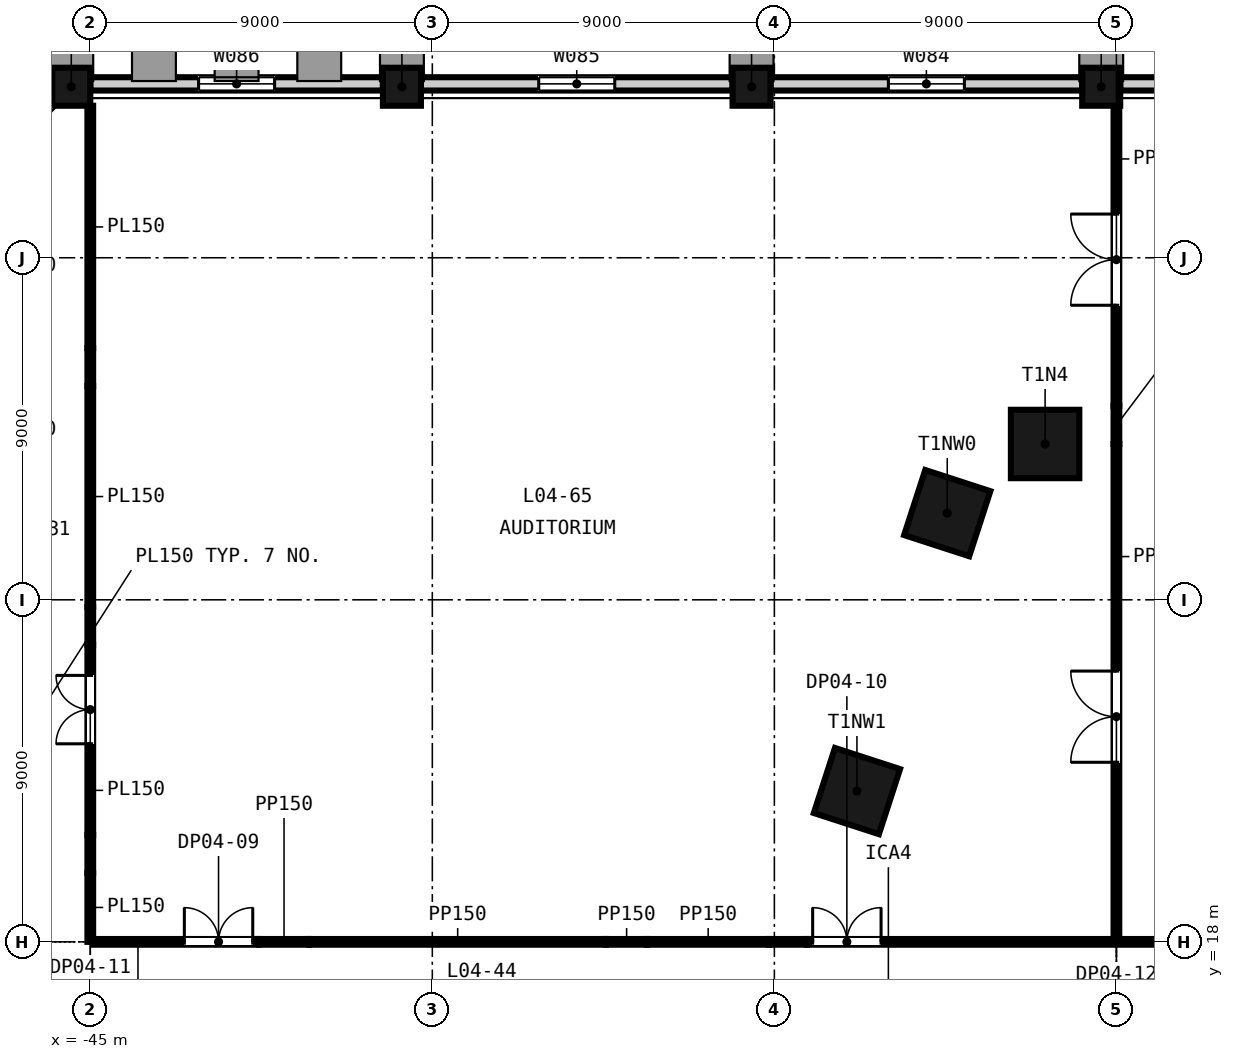
"""IFC4 building model, lengths in metres.
Left out: names, types, materials, properties, quantities, classifications, styles, units other than length and angle.
Written with IfcOpenShell. Run it as: python <this file> out.ifc"""

import sys

from ifc_helpers import new_model, si_unit, direction, frame, frame_2d, origin, origin_2d, place, context, subcontext, project, spatial, rectangle, extrude, element, fill, save


model = new_model("IFC4")
c1 = context("Model", 3, precision=1e-05, world=origin(), true_north=direction((0.0, 1.0)))
c2 = subcontext(c1, "Body", "Model", "MODEL_VIEW")
j1 = project(units=[si_unit("LENGTHUNIT", "METRE"), si_unit("PLANEANGLEUNIT", "RADIAN")], contexts=[c1])
p1 = place(None, origin())
s1 = spatial("IfcSite", under=j1, at=p1, CompositionType="ELEMENT")
p2 = place(p1, origin())
s2 = spatial("IfcBuilding", under=s1, at=p2, CompositionType="ELEMENT")
p3 = place(p2, frame((0.0, 0.0, 27.0)))
s3 = spatial("IfcBuildingStorey", under=s2, at=p3, CompositionType="ELEMENT", Elevation=27.0)
for number, where, z_axis, x_axis in (
    (1, (-19.876, 31.1, -0.3), (0.0, 0.0, 1.0), (-1.0, 0.0, 0.0)),
    (2, (-22.451, 29.281, -0.3), (0.0, 0.0, 1.0), (-0.309, -0.951, 0.0)),
    (3, (-24.827, 21.968, -0.3), (0.0, 0.0, 1.0), (-0.309, -0.951, 0.0)),
):
    element("IfcColumn", number, at=place(p3, frame(where, z_axis=z_axis, x_axis=x_axis)), inside=s3, PredefinedType="COLUMN", context=c2, shape_type="SweptSolid", body=[
        extrude(rectangle(XDim=1.8, YDim=1.8, at=origin_2d()), origin(), (0.0, 0.0, 1.0), 4.5),
    ])
for number, where, z_axis, x_axis in (
    (4, (-18.4, 40.5, -0.3), (0.0, 0.0, 1.0), (-1.0, 0.0, 0.0)),
    (5, (-27.6, 40.5, -0.3), (0.0, 0.0, 1.0), (-1.0, 0.0, 0.0)),
    (6, (-36.8, 40.5, -0.3), (0.0, 0.0, 1.0), (-1.0, 0.0, 0.0)),
    (7, (-45.5, 40.5, -0.3), (0.0, 0.0, 1.0), (-1.0, 0.0, 0.0)),
):
    element("IfcColumn", number, at=place(p3, frame(where, z_axis=z_axis, x_axis=x_axis)), inside=s3, PredefinedType="COLUMN", context=c2, shape_type="SweptSolid", body=[
        extrude(rectangle(XDim=1.0, YDim=1.0, at=origin_2d()), origin(), (0.0, 0.0, 1.0), 4.5),
    ])
p4 = place(p3, frame((-9.7, 40.575, -0.3), z_axis=(0.0, 0.0, 1.0), x_axis=(-1.0, 0.0, 0.0)))
e8 = element("IfcWall", 8, at=p4, inside=s3, PredefinedType="SOLIDWALL", context=c2, shape_type="SweptSolid", body=[
    extrude(rectangle(XDim=8.2, YDim=0.35, at=frame_2d((4.1, 0.0))), origin(), (0.0, 0.0, 1.0), 3.6),
])
p5 = place(p4, frame((3.1, 0.0, 1.2)))
e9 = element("IfcOpeningElement", 9, at=p5, cuts=e8, PredefinedType="OPENING", context=c2, shape_type="SweptSolid", body=[
    extrude(rectangle(XDim=2.0, YDim=2.35, at=frame_2d((1.0, 1.175))), frame((0.0, 0.185, 0.0), z_axis=(0.0, -1.0, 0.0), x_axis=(1.0, 0.0, 0.0)), (0.0, 0.0, 1.0), 0.37),
])
p6 = place(p3, frame((-18.9, 40.575, -0.3), z_axis=(0.0, 0.0, 1.0), x_axis=(-1.0, 0.0, 0.0)))
e10 = element("IfcWall", 10, at=p6, inside=s3, PredefinedType="SOLIDWALL", context=c2, shape_type="SweptSolid", body=[
    extrude(rectangle(XDim=8.2, YDim=0.35, at=frame_2d((4.1, 0.0))), origin(), (0.0, 0.0, 1.0), 3.6),
])
p7 = place(p6, frame((3.1, 0.0, 1.2)))
e11 = element("IfcOpeningElement", 11, at=p7, cuts=e10, PredefinedType="OPENING", context=c2, shape_type="SweptSolid", body=[
    extrude(rectangle(XDim=2.0, YDim=2.35, at=frame_2d((1.0, 1.175))), frame((0.0, 0.185, 0.0), z_axis=(0.0, -1.0, 0.0), x_axis=(1.0, 0.0, 0.0)), (0.0, 0.0, 1.0), 0.37),
])
p8 = place(p3, frame((-28.1, 40.575, -0.3), z_axis=(0.0, 0.0, 1.0), x_axis=(-1.0, 0.0, 0.0)))
e12 = element("IfcWall", 12, at=p8, inside=s3, PredefinedType="SOLIDWALL", context=c2, shape_type="SweptSolid", body=[
    extrude(rectangle(XDim=8.2, YDim=0.35, at=frame_2d((4.1, 0.0))), origin(), (0.0, 0.0, 1.0), 3.6),
])
p9 = place(p8, frame((3.1, 0.0, 1.2)))
e13 = element("IfcOpeningElement", 13, at=p9, cuts=e12, PredefinedType="OPENING", context=c2, shape_type="SweptSolid", body=[
    extrude(rectangle(XDim=2.0, YDim=2.35, at=frame_2d((1.0, 1.175))), frame((0.0, 0.185, 0.0), z_axis=(0.0, -1.0, 0.0), x_axis=(1.0, 0.0, 0.0)), (0.0, 0.0, 1.0), 0.37),
])
p10 = place(p3, frame((-37.3, 40.575, -0.3), z_axis=(0.0, 0.0, 1.0), x_axis=(-1.0, 0.0, 0.0)))
e14 = element("IfcWall", 14, at=p10, inside=s3, PredefinedType="SOLIDWALL", context=c2, shape_type="SweptSolid", body=[
    extrude(rectangle(XDim=7.7, YDim=0.35, at=frame_2d((3.85, 0.0))), origin(), (0.0, 0.0, 1.0), 3.6),
])
p11 = place(p10, frame((2.85, 0.0, 1.2)))
e15 = element("IfcOpeningElement", 15, at=p11, cuts=e14, PredefinedType="OPENING", context=c2, shape_type="SweptSolid", body=[
    extrude(rectangle(XDim=2.0, YDim=2.35, at=frame_2d((1.0, 1.175))), frame((0.0, 0.185, 0.0), z_axis=(0.0, -1.0, 0.0), x_axis=(1.0, 0.0, 0.0)), (0.0, 0.0, 1.0), 0.37),
])
p12 = place(p3, frame((-46.072, 40.327, -0.3), z_axis=(0.0, 0.0, 1.0), x_axis=(-0.707106781187, -0.707106781187, 0.0)))
e16 = element("IfcWall", 16, at=p12, inside=s3, PredefinedType="SOLIDWALL", context=c2, shape_type="SweptSolid", body=[
    extrude(rectangle(XDim=7.433, YDim=0.35, at=frame_2d((3.716, 0.0))), origin(), (0.0, 0.0, 1.0), 3.6),
])
p13 = place(p3, frame((-44.925, 18.0, 0.0), z_axis=(0.0, 0.0, 1.0), x_axis=(1.0, 0.0, 0.0)))
e17 = element("IfcWall", 17, at=p13, inside=s3, PredefinedType="PARTITIONING", context=c2, shape_type="SweptSolid", body=[
    extrude(rectangle(XDim=4.353, YDim=0.15, at=frame_2d((2.176, 0.0))), origin(), (0.0, 0.0, 1.0), 4.2),
])
p14 = place(p13, frame((2.4, 0.0, 0.0)))
e18 = element("IfcOpeningElement", 18, at=p14, cuts=e17, PredefinedType="OPENING", context=c2, shape_type="SweptSolid", body=[
    extrude(rectangle(XDim=1.8, YDim=2.4, at=frame_2d((0.9, 1.2))), frame((0.0, 0.085, 0.0), z_axis=(0.0, -1.0, 0.0), x_axis=(1.0, 0.0, 0.0)), (0.0, 0.0, 1.0), 0.17),
])
p15 = place(p3, frame((-40.572, 18.0, 0.0), z_axis=(0.0, 0.0, 1.0), x_axis=(1.0, 0.0, 0.0)))
e19 = element("IfcWall", 19, at=p15, inside=s3, PredefinedType="PARTITIONING", context=c2, shape_type="SweptSolid", body=[
    extrude(rectangle(XDim=1.331, YDim=0.15, at=frame_2d((0.666, 0.0))), origin(), (0.0, 0.0, 1.0), 3.111),
])
p16 = place(p3, frame((-39.241, 18.0, 0.0), z_axis=(0.0, 0.0, 1.0), x_axis=(1.0, 0.0, 0.0)))
e20 = element("IfcWall", 20, at=p16, inside=s3, PredefinedType="PARTITIONING", context=c2, shape_type="SweptSolid", body=[
    extrude(rectangle(XDim=7.807, YDim=0.15, at=frame_2d((3.903, 0.0))), origin(), (0.0, 0.0, 1.0), 4.2),
])
p17 = place(p3, frame((-31.434, 18.0, 0.0), z_axis=(0.0, 0.0, 1.0), x_axis=(1.0, 0.0, 0.0)))
e21 = element("IfcWall", 21, at=p17, inside=s3, PredefinedType="PARTITIONING", context=c2, shape_type="SweptSolid", body=[
    extrude(rectangle(XDim=1.083, YDim=0.15, at=frame_2d((0.542, 0.0))), origin(), (0.0, 0.0, 1.0), 3.111),
])
p18 = place(p3, frame((-30.351, 18.0, 0.0), z_axis=(0.0, 0.0, 1.0), x_axis=(1.0, 0.0, 0.0)))
e22 = element("IfcWall", 22, at=p18, inside=s3, PredefinedType="PARTITIONING", context=c2, shape_type="SweptSolid", body=[
    extrude(rectangle(XDim=3.209, YDim=0.15, at=frame_2d((1.604, 0.0))), origin(), (0.0, 0.0, 1.0), 4.2),
])
p19 = place(p3, frame((-27.142, 18.0, 0.0), z_axis=(0.0, 0.0, 1.0), x_axis=(1.0, 0.0, 0.0)))
e23 = element("IfcWall", 23, at=p19, inside=s3, PredefinedType="PARTITIONING", context=c2, shape_type="SweptSolid", body=[
    extrude(rectangle(XDim=1.0, YDim=0.15, at=frame_2d((0.5, 0.0))), origin(), (0.0, 0.0, 1.0), 3.2),
])
p20 = place(p3, frame((-26.142, 18.0, 0.0), z_axis=(0.0, 0.0, 1.0), x_axis=(1.0, 0.0, 0.0)))
e24 = element("IfcWall", 24, at=p20, inside=s3, PredefinedType="PARTITIONING", context=c2, shape_type="SweptSolid", body=[
    extrude(rectangle(XDim=44.067, YDim=0.15, at=frame_2d((22.034, 0.0))), origin(), (0.0, 0.0, 1.0), 4.2),
])
p21 = place(p20, frame((0.15, 0.0, 0.0)))
e25 = element("IfcOpeningElement", 25, at=p21, cuts=e24, PredefinedType="OPENING", context=c2, shape_type="SweptSolid", body=[
    extrude(rectangle(XDim=1.8, YDim=2.4, at=frame_2d((0.9, 1.2))), frame((0.0, 0.085, 0.0), z_axis=(0.0, -1.0, 0.0), x_axis=(1.0, 0.0, 0.0)), (0.0, 0.0, 1.0), 0.17),
])
p22 = place(p20, frame((12.292, 0.0, 0.0)))
e26 = element("IfcOpeningElement", 26, at=p22, cuts=e24, PredefinedType="OPENING", context=c2, shape_type="SweptSolid", body=[
    extrude(rectangle(XDim=1.8, YDim=2.4, at=frame_2d((0.9, 1.2))), frame((0.0, 0.085, 0.0), z_axis=(0.0, -1.0, 0.0), x_axis=(1.0, 0.0, 0.0)), (0.0, 0.0, 1.0), 0.17),
])
p23 = place(p20, frame((29.542, 0.0, 0.0)))
e27 = element("IfcOpeningElement", 27, at=p23, cuts=e24, PredefinedType="OPENING", context=c2, shape_type="SweptSolid", body=[
    extrude(rectangle(XDim=1.0, YDim=2.1, at=frame_2d((0.5, 1.05))), frame((0.0, 0.085, 0.0), z_axis=(0.0, -1.0, 0.0), x_axis=(1.0, 0.0, 0.0)), (0.0, 0.0, 1.0), 0.17),
])
p24 = place(p20, frame((38.542, 0.0, 0.0)))
e28 = element("IfcOpeningElement", 28, at=p24, cuts=e24, PredefinedType="OPENING", context=c2, shape_type="SweptSolid", body=[
    extrude(rectangle(XDim=1.0, YDim=2.1, at=frame_2d((0.5, 1.05))), frame((0.0, 0.085, 0.0), z_axis=(0.0, -1.0, 0.0), x_axis=(1.0, 0.0, 0.0)), (0.0, 0.0, 1.0), 0.17),
])
p25 = place(p3, frame((-45.0, 18.0, 0.0), z_axis=(0.0, 0.0, 1.0), x_axis=(0.0, 1.0, 0.0)))
e29 = element("IfcWall", 29, at=p25, inside=s3, PredefinedType="PARTITIONING", context=c2, shape_type="SweptSolid", body=[
    extrude(rectangle(XDim=1.811, YDim=0.15, at=frame_2d((0.906, 0.0))), origin(), (0.0, 0.0, 1.0), 4.2),
])
p26 = place(p3, frame((-45.0, 19.811, 0.0), z_axis=(0.0, 0.0, 1.0), x_axis=(0.0, 1.0, 0.0)))
e30 = element("IfcWall", 30, at=p26, inside=s3, PredefinedType="PARTITIONING", context=c2, shape_type="SweptSolid", body=[
    extrude(rectangle(XDim=1.0, YDim=0.15, at=frame_2d((0.5, 0.0))), origin(), (0.0, 0.0, 1.0), 3.111),
])
p27 = place(p3, frame((-45.0, 20.811, 0.0), z_axis=(0.0, 0.0, 1.0), x_axis=(0.0, 1.0, 0.0)))
e31 = element("IfcWall", 31, at=p27, inside=s3, PredefinedType="PARTITIONING", context=c2, shape_type="SweptSolid", body=[
    extrude(rectangle(XDim=5.002, YDim=0.15, at=frame_2d((2.501, 0.0))), origin(), (0.0, 0.0, 1.0), 4.2),
])
p28 = place(p27, frame((2.4, 0.0, 0.0)))
e32 = element("IfcOpeningElement", 32, at=p28, cuts=e31, PredefinedType="OPENING", context=c2, shape_type="SweptSolid", body=[
    extrude(rectangle(XDim=1.8, YDim=2.4, at=frame_2d((0.9, 1.2))), frame((0.0, 0.085, 0.0), z_axis=(0.0, -1.0, 0.0), x_axis=(1.0, 0.0, 0.0)), (0.0, 0.0, 1.0), 0.17),
])
p29 = place(p3, frame((-45.0, 25.813, 0.0), z_axis=(0.0, 0.0, 1.0), x_axis=(0.0, 1.0, 0.0)))
e33 = element("IfcWall", 33, at=p29, inside=s3, PredefinedType="PARTITIONING", context=c2, shape_type="SweptSolid", body=[
    extrude(rectangle(XDim=1.0, YDim=0.15, at=frame_2d((0.5, 0.0))), origin(), (0.0, 0.0, 1.0), 3.111),
])
p30 = place(p3, frame((-45.0, 26.813, 0.0), z_axis=(0.0, 0.0, 1.0), x_axis=(0.0, 1.0, 0.0)))
e34 = element("IfcWall", 34, at=p30, inside=s3, PredefinedType="PARTITIONING", context=c2, shape_type="SweptSolid", body=[
    extrude(rectangle(XDim=5.808, YDim=0.15, at=frame_2d((2.904, 0.0))), origin(), (0.0, 0.0, 1.0), 4.2),
])
p31 = place(p3, frame((-45.0, 32.621, 0.0), z_axis=(0.0, 0.0, 1.0), x_axis=(0.0, 1.0, 0.0)))
e35 = element("IfcWall", 35, at=p31, inside=s3, PredefinedType="PARTITIONING", context=c2, shape_type="SweptSolid", body=[
    extrude(rectangle(XDim=1.0, YDim=0.15, at=frame_2d((0.5, 0.0))), origin(), (0.0, 0.0, 1.0), 3.111),
])
p32 = place(p3, frame((-45.0, 33.621, 0.0), z_axis=(0.0, 0.0, 1.0), x_axis=(0.0, 1.0, 0.0)))
e36 = element("IfcWall", 36, at=p32, inside=s3, PredefinedType="PARTITIONING", context=c2, shape_type="SweptSolid", body=[
    extrude(rectangle(XDim=6.379, YDim=0.15, at=frame_2d((3.189, 0.0))), origin(), (0.0, 0.0, 1.0), 4.2),
])
p33 = place(p3, frame((-18.0, 18.075, 0.0), z_axis=(0.0, 0.0, 1.0), x_axis=(0.0, 1.0, 0.0)))
e37 = element("IfcWall", 37, at=p33, inside=s3, PredefinedType="PARTITIONING", context=c2, shape_type="SweptSolid", body=[
    extrude(rectangle(XDim=13.025, YDim=0.15, at=frame_2d((6.513, 0.0))), origin(), (0.0, 0.0, 1.0), 4.2),
])
p34 = place(p33, frame((4.65, 0.0, 0.0)))
e38 = element("IfcOpeningElement", 38, at=p34, cuts=e37, PredefinedType="OPENING", context=c2, shape_type="SweptSolid", body=[
    extrude(rectangle(XDim=2.4, YDim=2.4, at=frame_2d((1.2, 1.2))), frame((0.0, 0.085, 0.0), z_axis=(0.0, -1.0, 0.0), x_axis=(1.0, 0.0, 0.0)), (0.0, 0.0, 1.0), 0.17),
])
p35 = place(p3, frame((-18.0, 31.1, 0.0), z_axis=(0.0, 0.0, 1.0), x_axis=(0.0, 1.0, 0.0)))
e39 = element("IfcWall", 39, at=p35, inside=s3, PredefinedType="PARTITIONING", context=c2, shape_type="SweptSolid", body=[
    extrude(rectangle(XDim=1.0, YDim=0.15, at=frame_2d((0.5, 0.0))), origin(), (0.0, 0.0, 1.0), 3.2),
])
p36 = place(p3, frame((-18.0, 32.1, 0.0), z_axis=(0.0, 0.0, 1.0), x_axis=(0.0, 1.0, 0.0)))
e40 = element("IfcWall", 40, at=p36, inside=s3, PredefinedType="PARTITIONING", context=c2, shape_type="SweptSolid", body=[
    extrude(rectangle(XDim=7.9, YDim=0.15, at=frame_2d((3.95, 0.0))), origin(), (0.0, 0.0, 1.0), 4.2),
])
p37 = place(p36, frame((2.65, 0.0, 0.0)))
e41 = element("IfcOpeningElement", 41, at=p37, cuts=e40, PredefinedType="OPENING", context=c2, shape_type="SweptSolid", body=[
    extrude(rectangle(XDim=2.4, YDim=2.4, at=frame_2d((1.2, 1.2))), frame((0.0, 0.085, 0.0), z_axis=(0.0, -1.0, 0.0), x_axis=(1.0, 0.0, 0.0)), (0.0, 0.0, 1.0), 0.17),
])
p38 = place(p7, origin())
e42 = element("IfcWindow", 42, at=p38, inside=s3, PartitioningType="SINGLE_PANEL", PredefinedType="WINDOW", context=c2, shape_type="SweptSolid", body=[
    extrude(rectangle(XDim=2.0, YDim=2.35, at=frame_2d((1.0, 1.175))), frame((0.0, 0.03, 0.0), z_axis=(0.0, -1.0, 0.0), x_axis=(1.0, 0.0, 0.0)), (0.0, 0.0, 1.0), 0.06),
])
fill(e11, e42)
p39 = place(p9, origin())
e43 = element("IfcWindow", 43, at=p39, inside=s3, PartitioningType="SINGLE_PANEL", PredefinedType="WINDOW", context=c2, shape_type="SweptSolid", body=[
    extrude(rectangle(XDim=2.0, YDim=2.35, at=frame_2d((1.0, 1.175))), frame((0.0, 0.03, 0.0), z_axis=(0.0, -1.0, 0.0), x_axis=(1.0, 0.0, 0.0)), (0.0, 0.0, 1.0), 0.06),
])
fill(e13, e43)
p40 = place(p11, origin())
e44 = element("IfcWindow", 44, at=p40, inside=s3, PartitioningType="SINGLE_PANEL", PredefinedType="WINDOW", context=c2, shape_type="SweptSolid", body=[
    extrude(rectangle(XDim=2.0, YDim=2.35, at=frame_2d((1.0, 1.175))), frame((0.0, 0.03, 0.0), z_axis=(0.0, -1.0, 0.0), x_axis=(1.0, 0.0, 0.0)), (0.0, 0.0, 1.0), 0.06),
])
fill(e15, e44)
p41 = place(p14, origin())
e45 = element("IfcDoor", 45, at=p41, inside=s3, OperationType="SINGLE_SWING_LEFT", PredefinedType="DOOR", context=c2, shape_type="SweptSolid", body=[
    extrude(rectangle(XDim=1.8, YDim=2.4, at=frame_2d((0.9, 1.2))), frame((0.0, 0.025, 0.0), z_axis=(0.0, -1.0, 0.0), x_axis=(1.0, 0.0, 0.0)), (0.0, 0.0, 1.0), 0.05),
])
fill(e18, e45)
p42 = place(p21, origin())
e46 = element("IfcDoor", 46, at=p42, inside=s3, OperationType="SINGLE_SWING_LEFT", PredefinedType="DOOR", context=c2, shape_type="SweptSolid", body=[
    extrude(rectangle(XDim=1.8, YDim=2.4, at=frame_2d((0.9, 1.2))), frame((0.0, 0.025, 0.0), z_axis=(0.0, -1.0, 0.0), x_axis=(1.0, 0.0, 0.0)), (0.0, 0.0, 1.0), 0.05),
])
fill(e25, e46)
p43 = place(p28, origin())
e47 = element("IfcDoor", 47, at=p43, inside=s3, OperationType="SINGLE_SWING_LEFT", PredefinedType="DOOR", context=c2, shape_type="SweptSolid", body=[
    extrude(rectangle(XDim=1.8, YDim=2.4, at=frame_2d((0.9, 1.2))), frame((0.0, 0.025, 0.0), z_axis=(0.0, -1.0, 0.0), x_axis=(1.0, 0.0, 0.0)), (0.0, 0.0, 1.0), 0.05),
])
fill(e32, e47)
p44 = place(p34, origin())
e48 = element("IfcDoor", 48, at=p44, inside=s3, OperationType="SINGLE_SWING_LEFT", PredefinedType="DOOR", context=c2, shape_type="SweptSolid", body=[
    extrude(rectangle(XDim=2.4, YDim=2.4, at=frame_2d((1.2, 1.2))), frame((0.0, 0.025, 0.0), z_axis=(0.0, -1.0, 0.0), x_axis=(1.0, 0.0, 0.0)), (0.0, 0.0, 1.0), 0.05),
])
fill(e38, e48)
p45 = place(p37, origin())
e49 = element("IfcDoor", 49, at=p45, inside=s3, OperationType="SINGLE_SWING_LEFT", PredefinedType="DOOR", context=c2, shape_type="SweptSolid", body=[
    extrude(rectangle(XDim=2.4, YDim=2.4, at=frame_2d((1.2, 1.2))), frame((0.0, 0.025, 0.0), z_axis=(0.0, -1.0, 0.0), x_axis=(1.0, 0.0, 0.0)), (0.0, 0.0, 1.0), 0.05),
])
fill(e41, e49)
save(model, sys.argv[1])
